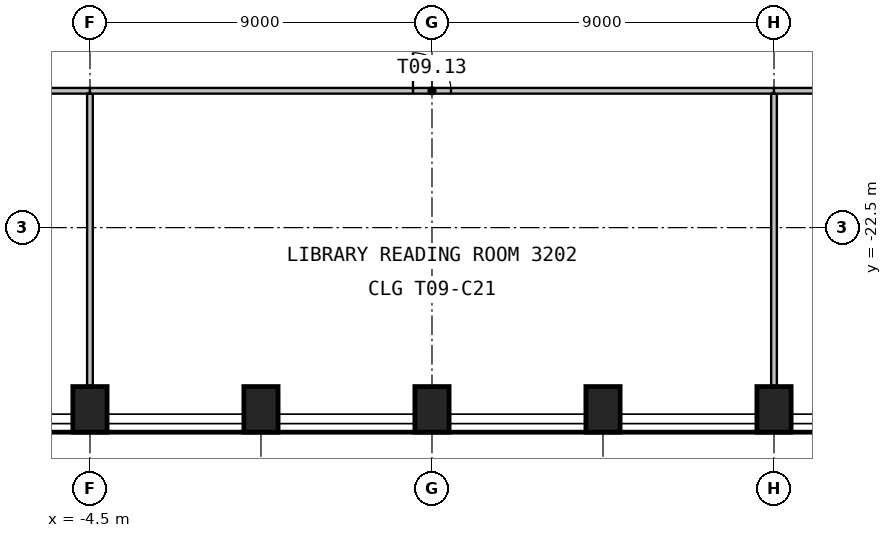
"""IFC4 building model, lengths in metres.
Left out: names, types, materials, properties, quantities, classifications, styles, units other than length and angle.
Written with IfcOpenShell. Run it as: python <this file> out.ifc"""

import sys

from ifc_helpers import new_model, si_unit, direction, frame, frame_2d, origin, origin_2d, place, context, subcontext, project, spatial, rectangle, extrude, element, fill, save


model = new_model("IFC4")
c1 = context("Model", 3, precision=1e-05, world=origin(), true_north=direction((0.0, 1.0)))
c2 = subcontext(c1, "Body", "Model", "MODEL_VIEW")
j1 = project(units=[si_unit("LENGTHUNIT", "METRE"), si_unit("PLANEANGLEUNIT", "RADIAN")], contexts=[c1])
p1 = place(None, origin())
s1 = spatial("IfcSite", under=j1, at=p1, CompositionType="ELEMENT")
p2 = place(p1, origin())
s2 = spatial("IfcBuilding", under=s1, at=p2, CompositionType="ELEMENT")
p3 = place(p2, frame((0.0, 0.0, 132.6)))
s3 = spatial("IfcBuildingStorey", under=s2, at=p3, CompositionType="ELEMENT", Elevation=132.6)
for number, where, z_axis, x_axis in (
    (1, (-4.5, -27.283, 0.0), (0.0, 0.0, 1.0), (1.0, 0.0, 0.0)),
    (2, (0.0, -27.283, 0.0), (0.0, 0.0, 1.0), (1.0, 0.0, 0.0)),
    (3, (4.5, -27.283, 0.0), (0.0, 0.0, 1.0), (1.0, 0.0, 0.0)),
    (4, (9.0, -27.283, 0.0), (0.0, 0.0, 1.0), (1.0, 0.0, 0.0)),
    (5, (13.5, -27.283, 0.0), (0.0, 0.0, 1.0), (1.0, 0.0, 0.0)),
):
    element("IfcColumn", number, at=place(p3, frame(where, z_axis=z_axis, x_axis=x_axis)), inside=s3, PredefinedType="COLUMN", context=c2, shape_type="SweptSolid", body=[
        extrude(rectangle(XDim=0.9, YDim=1.2, at=origin_2d()), origin(), (0.0, 0.0, 1.0), 3.575),
    ])
p4 = place(p3, frame((-15.593, -18.9, 0.0), z_axis=(0.0, 0.0, 1.0), x_axis=(1.0, 0.0, 0.0)))
e6 = element("IfcWall", 6, at=p4, inside=s3, PredefinedType="PARTITIONING", context=c2, shape_type="SweptSolid", body=[
    extrude(rectangle(XDim=11.093, YDim=0.15, at=frame_2d((5.546, 0.0))), origin(), (0.0, 0.0, 1.0), 3.575),
])
p5 = place(p4, frame((5.046, 0.0, 0.0)))
e7 = element("IfcOpeningElement", 7, at=p5, cuts=e6, PredefinedType="OPENING", context=c2, shape_type="SweptSolid", body=[
    extrude(rectangle(XDim=1.0, YDim=2.1, at=frame_2d((0.5, 1.05))), frame((0.0, 0.085, 0.0), z_axis=(0.0, -1.0, 0.0), x_axis=(1.0, 0.0, 0.0)), (0.0, 0.0, 1.0), 0.17),
])
p6 = place(p3, frame((-4.5, -18.975, 0.0), z_axis=(0.0, 0.0, 1.0), x_axis=(0.0, -1.0, 0.0)))
e8 = element("IfcWall", 8, at=p6, inside=s3, PredefinedType="PARTITIONING", context=c2, shape_type="SweptSolid", body=[
    extrude(rectangle(XDim=7.688, YDim=0.15, at=frame_2d((3.844, 0.0))), origin(), (0.0, 0.0, 1.0), 3.575),
])
p7 = place(p3, frame((-4.5, -18.9, 0.0), z_axis=(0.0, 0.0, 1.0), x_axis=(1.0, 0.0, 0.0)))
e9 = element("IfcWall", 9, at=p7, inside=s3, PredefinedType="PARTITIONING", context=c2, shape_type="SweptSolid", body=[
    extrude(rectangle(XDim=18.0, YDim=0.15, at=frame_2d((9.0, 0.0))), origin(), (0.0, 0.0, 1.0), 3.575),
])
p8 = place(p7, frame((8.5, 0.0, 0.0)))
e10 = element("IfcOpeningElement", 10, at=p8, cuts=e9, PredefinedType="OPENING", context=c2, shape_type="SweptSolid", body=[
    extrude(rectangle(XDim=1.0, YDim=2.1, at=frame_2d((0.5, 1.05))), frame((0.0, 0.085, 0.0), z_axis=(0.0, -1.0, 0.0), x_axis=(1.0, 0.0, 0.0)), (0.0, 0.0, 1.0), 0.17),
])
p9 = place(p3, frame((13.5, -18.975, 0.0), z_axis=(0.0, 0.0, 1.0), x_axis=(0.0, -1.0, 0.0)))
e11 = element("IfcWall", 11, at=p9, inside=s3, PredefinedType="PARTITIONING", context=c2, shape_type="SweptSolid", body=[
    extrude(rectangle(XDim=7.688, YDim=0.15, at=frame_2d((3.844, 0.0))), origin(), (0.0, 0.0, 1.0), 3.575),
])
p10 = place(p3, frame((13.5, -18.9, 0.0), z_axis=(0.0, 0.0, 1.0), x_axis=(1.0, 0.0, 0.0)))
e12 = element("IfcWall", 12, at=p10, inside=s3, PredefinedType="PARTITIONING", context=c2, shape_type="SweptSolid", body=[
    extrude(rectangle(XDim=7.725, YDim=0.15, at=frame_2d((3.863, 0.0))), origin(), (0.0, 0.0, 1.0), 3.575),
])
p11 = place(p10, frame((3.363, 0.0, 0.0)))
e13 = element("IfcOpeningElement", 13, at=p11, cuts=e12, PredefinedType="OPENING", context=c2, shape_type="SweptSolid", body=[
    extrude(rectangle(XDim=1.0, YDim=2.1, at=frame_2d((0.5, 1.05))), frame((0.0, 0.085, 0.0), z_axis=(0.0, -1.0, 0.0), x_axis=(1.0, 0.0, 0.0)), (0.0, 0.0, 1.0), 0.17),
])
p12 = place(p8, origin())
e14 = element("IfcDoor", 14, at=p12, inside=s3, OperationType="SINGLE_SWING_LEFT", PredefinedType="DOOR", context=c2, shape_type="SweptSolid", body=[
    extrude(rectangle(XDim=1.0, YDim=2.1, at=frame_2d((0.5, 1.05))), frame((0.0, 0.025, 0.0), z_axis=(0.0, -1.0, 0.0), x_axis=(1.0, 0.0, 0.0)), (0.0, 0.0, 1.0), 0.05),
])
fill(e10, e14)
save(model, sys.argv[1])
